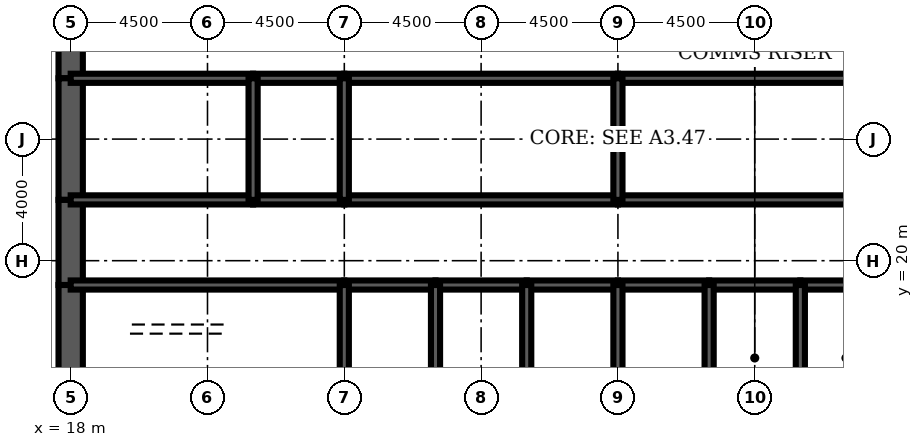
"""IFC4 building model, lengths in metres.
Left out: names, types, materials, properties, quantities, classifications, styles, units other than length and angle.
Written with IfcOpenShell. Run it as: python <this file> out.ifc"""

import sys

from ifc_helpers import new_model, si_unit, direction, frame, frame_2d, origin, place, context, subcontext, project, spatial, rectangle, extrude, element, fill, save


model = new_model("IFC4")
c1 = context("Model", 3, precision=1e-05, world=origin(), true_north=direction((0.0, 1.0)))
c2 = subcontext(c1, "Body", "Model", "MODEL_VIEW")
j1 = project(units=[si_unit("LENGTHUNIT", "METRE"), si_unit("PLANEANGLEUNIT", "RADIAN")], contexts=[c1])
p1 = place(None, origin())
s1 = spatial("IfcSite", under=j1, at=p1, CompositionType="ELEMENT")
p2 = place(p1, origin())
s2 = spatial("IfcBuilding", under=s1, at=p2, CompositionType="ELEMENT")
p3 = place(p2, frame((0.0, 0.0, 202.6)))
s3 = spatial("IfcBuildingStorey", under=s2, at=p3, CompositionType="ELEMENT", Elevation=202.6)
p4 = place(p3, frame((18.0, 28.8, 0.0), z_axis=(0.0, 0.0, 1.0), x_axis=(0.0, -1.0, 0.0)))
e1 = element("IfcWall", 1, at=p4, inside=s3, PredefinedType="SHEAR", context=c2, shape_type="SweptSolid", body=[
    extrude(rectangle(XDim=2.8, YDim=0.8, at=frame_2d((1.4, 0.0))), origin(), (0.0, 0.0, 1.0), 4.2),
])
p5 = place(p4, frame((0.4, 0.0, 0.0)))
e2 = element("IfcOpeningElement", 2, at=p5, cuts=e1, PredefinedType="OPENING", context=c2, shape_type="SweptSolid", body=[
    extrude(rectangle(XDim=1.8, YDim=2.1, at=frame_2d((0.9, 1.05))), frame((0.0, 0.41, 0.0), z_axis=(0.0, -1.0, 0.0), x_axis=(1.0, 0.0, 0.0)), (0.0, 0.0, 1.0), 0.82),
])
p6 = place(p3, frame((18.0, 26.0, 0.0), z_axis=(0.0, 0.0, 1.0), x_axis=(0.0, -1.0, 0.0)))
e3 = element("IfcWall", 3, at=p6, inside=s3, PredefinedType="SHEAR", context=c2, shape_type="SweptSolid", body=[
    extrude(rectangle(XDim=4.0, YDim=0.8, at=frame_2d((2.0, 0.0))), origin(), (0.0, 0.0, 1.0), 4.2),
])
p7 = place(p3, frame((18.0, 22.0, 0.0), z_axis=(0.0, 0.0, 1.0), x_axis=(0.0, -1.0, 0.0)))
e4 = element("IfcWall", 4, at=p7, inside=s3, PredefinedType="SHEAR", context=c2, shape_type="SweptSolid", body=[
    extrude(rectangle(XDim=2.8, YDim=0.8, at=frame_2d((1.4, 0.0))), origin(), (0.0, 0.0, 1.0), 4.2),
])
p8 = place(p7, frame((0.6, 0.0, 0.0)))
e5 = element("IfcOpeningElement", 5, at=p8, cuts=e4, PredefinedType="OPENING", context=c2, shape_type="SweptSolid", body=[
    extrude(rectangle(XDim=1.8, YDim=2.1, at=frame_2d((0.9, 1.05))), frame((0.0, 0.41, 0.0), z_axis=(0.0, -1.0, 0.0), x_axis=(1.0, 0.0, 0.0)), (0.0, 0.0, 1.0), 0.82),
])
p9 = place(p3, frame((18.0, 19.2, 0.0), z_axis=(0.0, 0.0, 1.0), x_axis=(0.0, -1.0, 0.0)))
e6 = element("IfcWall", 6, at=p9, inside=s3, PredefinedType="SHEAR", context=c2, shape_type="SweptSolid", body=[
    extrude(rectangle(XDim=3.2, YDim=0.8, at=frame_2d((1.6, 0.0))), origin(), (0.0, 0.0, 1.0), 4.2),
])
p10 = place(p3, frame((18.0, 19.2, 0.0), z_axis=(0.0, 0.0, 1.0), x_axis=(1.0, 0.0, 0.0)))
e7 = element("IfcWall", 7, at=p10, inside=s3, PredefinedType="SOLIDWALL", context=c2, shape_type="SweptSolid", body=[
    extrude(rectangle(XDim=9.0, YDim=0.3, at=frame_2d((4.5, 0.0))), origin(), (0.0, 0.0, 1.0), 4.2),
])
p11 = place(p10, frame((0.65, 0.0, 0.0)))
e8 = element("IfcOpeningElement", 8, at=p11, cuts=e7, PredefinedType="OPENING", context=c2, shape_type="SweptSolid", body=[
    extrude(rectangle(XDim=1.0, YDim=2.1, at=frame_2d((0.5, 1.05))), frame((0.0, 0.16, 0.0), z_axis=(0.0, -1.0, 0.0), x_axis=(1.0, 0.0, 0.0)), (0.0, 0.0, 1.0), 0.32),
])
p12 = place(p3, frame((27.0, 19.2, 0.0), z_axis=(0.0, 0.0, 1.0), x_axis=(1.0, 0.0, 0.0)))
e9 = element("IfcWall", 9, at=p12, inside=s3, PredefinedType="SOLIDWALL", context=c2, shape_type="SweptSolid", body=[
    extrude(rectangle(XDim=3.0, YDim=0.3, at=frame_2d((1.5, 0.0))), origin(), (0.0, 0.0, 1.0), 4.2),
])
p13 = place(p12, frame((0.95, 0.0, 0.0)))
e10 = element("IfcOpeningElement", 10, at=p13, cuts=e9, PredefinedType="OPENING", context=c2, shape_type="SweptSolid", body=[
    extrude(rectangle(XDim=1.1, YDim=2.2, at=frame_2d((0.55, 1.1))), frame((0.0, 0.16, 0.0), z_axis=(0.0, -1.0, 0.0), x_axis=(1.0, 0.0, 0.0)), (0.0, 0.0, 1.0), 0.32),
])
p14 = place(p3, frame((30.0, 19.2, 0.0), z_axis=(0.0, 0.0, 1.0), x_axis=(1.0, 0.0, 0.0)))
e11 = element("IfcWall", 11, at=p14, inside=s3, PredefinedType="SOLIDWALL", context=c2, shape_type="SweptSolid", body=[
    extrude(rectangle(XDim=3.0, YDim=0.3, at=frame_2d((1.5, 0.0))), origin(), (0.0, 0.0, 1.0), 4.2),
])
p15 = place(p14, frame((0.95, 0.0, 0.0)))
e12 = element("IfcOpeningElement", 12, at=p15, cuts=e11, PredefinedType="OPENING", context=c2, shape_type="SweptSolid", body=[
    extrude(rectangle(XDim=1.1, YDim=2.2, at=frame_2d((0.55, 1.1))), frame((0.0, 0.16, 0.0), z_axis=(0.0, -1.0, 0.0), x_axis=(1.0, 0.0, 0.0)), (0.0, 0.0, 1.0), 0.32),
])
p16 = place(p3, frame((33.0, 19.2, 0.0), z_axis=(0.0, 0.0, 1.0), x_axis=(1.0, 0.0, 0.0)))
e13 = element("IfcWall", 13, at=p16, inside=s3, PredefinedType="SOLIDWALL", context=c2, shape_type="SweptSolid", body=[
    extrude(rectangle(XDim=3.0, YDim=0.3, at=frame_2d((1.5, 0.0))), origin(), (0.0, 0.0, 1.0), 4.2),
])
p17 = place(p16, frame((0.95, 0.0, 0.0)))
e14 = element("IfcOpeningElement", 14, at=p17, cuts=e13, PredefinedType="OPENING", context=c2, shape_type="SweptSolid", body=[
    extrude(rectangle(XDim=1.1, YDim=2.2, at=frame_2d((0.55, 1.1))), frame((0.0, 0.16, 0.0), z_axis=(0.0, -1.0, 0.0), x_axis=(1.0, 0.0, 0.0)), (0.0, 0.0, 1.0), 0.32),
])
p18 = place(p3, frame((36.0, 19.2, 0.0), z_axis=(0.0, 0.0, 1.0), x_axis=(1.0, 0.0, 0.0)))
e15 = element("IfcWall", 15, at=p18, inside=s3, PredefinedType="SOLIDWALL", context=c2, shape_type="SweptSolid", body=[
    extrude(rectangle(XDim=3.0, YDim=0.3, at=frame_2d((1.5, 0.0))), origin(), (0.0, 0.0, 1.0), 4.2),
])
p19 = place(p18, frame((0.95, 0.0, 0.0)))
e16 = element("IfcOpeningElement", 16, at=p19, cuts=e15, PredefinedType="OPENING", context=c2, shape_type="SweptSolid", body=[
    extrude(rectangle(XDim=1.1, YDim=2.2, at=frame_2d((0.55, 1.1))), frame((0.0, 0.16, 0.0), z_axis=(0.0, -1.0, 0.0), x_axis=(1.0, 0.0, 0.0)), (0.0, 0.0, 1.0), 0.32),
])
p20 = place(p3, frame((39.0, 19.2, 0.0), z_axis=(0.0, 0.0, 1.0), x_axis=(1.0, 0.0, 0.0)))
e17 = element("IfcWall", 17, at=p20, inside=s3, PredefinedType="SOLIDWALL", context=c2, shape_type="SweptSolid", body=[
    extrude(rectangle(XDim=3.0, YDim=0.3, at=frame_2d((1.5, 0.0))), origin(), (0.0, 0.0, 1.0), 4.2),
])
p21 = place(p20, frame((1.0, 0.0, 0.0)))
e18 = element("IfcOpeningElement", 18, at=p21, cuts=e17, PredefinedType="OPENING", context=c2, shape_type="SweptSolid", body=[
    extrude(rectangle(XDim=1.0, YDim=2.1, at=frame_2d((0.5, 1.05))), frame((0.0, 0.16, 0.0), z_axis=(0.0, -1.0, 0.0), x_axis=(1.0, 0.0, 0.0)), (0.0, 0.0, 1.0), 0.32),
])
p22 = place(p3, frame((42.0, 19.2, 0.0), z_axis=(0.0, 0.0, 1.0), x_axis=(1.0, 0.0, 0.0)))
e19 = element("IfcWall", 19, at=p22, inside=s3, PredefinedType="SOLIDWALL", context=c2, shape_type="SweptSolid", body=[
    extrude(rectangle(XDim=3.0, YDim=0.3, at=frame_2d((1.5, 0.0))), origin(), (0.0, 0.0, 1.0), 4.2),
])
p23 = place(p22, frame((1.0, 0.0, 0.0)))
e20 = element("IfcOpeningElement", 20, at=p23, cuts=e19, PredefinedType="OPENING", context=c2, shape_type="SweptSolid", body=[
    extrude(rectangle(XDim=1.0, YDim=2.1, at=frame_2d((0.5, 1.05))), frame((0.0, 0.16, 0.0), z_axis=(0.0, -1.0, 0.0), x_axis=(1.0, 0.0, 0.0)), (0.0, 0.0, 1.0), 0.32),
])
p24 = place(p3, frame((18.0, 22.0, 0.0), z_axis=(0.0, 0.0, 1.0), x_axis=(1.0, 0.0, 0.0)))
e21 = element("IfcWall", 21, at=p24, inside=s3, PredefinedType="SOLIDWALL", context=c2, shape_type="SweptSolid", body=[
    extrude(rectangle(XDim=6.0, YDim=0.3, at=frame_2d((3.0, 0.0))), origin(), (0.0, 0.0, 1.0), 4.2),
])
p25 = place(p24, frame((4.4, 0.0, 0.0)))
e22 = element("IfcOpeningElement", 22, at=p25, cuts=e21, PredefinedType="OPENING", context=c2, shape_type="SweptSolid", body=[
    extrude(rectangle(XDim=1.0, YDim=2.1, at=frame_2d((0.5, 1.05))), frame((0.0, 0.16, 0.0), z_axis=(0.0, -1.0, 0.0), x_axis=(1.0, 0.0, 0.0)), (0.0, 0.0, 1.0), 0.32),
])
p26 = place(p24, frame((0.65, 0.0, 0.0)))
e23 = element("IfcOpeningElement", 23, at=p26, cuts=e21, PredefinedType="OPENING", context=c2, shape_type="SweptSolid", body=[
    extrude(rectangle(XDim=1.0, YDim=2.1, at=frame_2d((0.5, 1.05))), frame((0.0, 0.16, 0.0), z_axis=(0.0, -1.0, 0.0), x_axis=(1.0, 0.0, 0.0)), (0.0, 0.0, 1.0), 0.32),
])
p27 = place(p3, frame((24.0, 22.0, 0.0), z_axis=(0.0, 0.0, 1.0), x_axis=(1.0, 0.0, 0.0)))
e24 = element("IfcWall", 24, at=p27, inside=s3, PredefinedType="SOLIDWALL", context=c2, shape_type="SweptSolid", body=[
    extrude(rectangle(XDim=3.0, YDim=0.3, at=frame_2d((1.5, 0.0))), origin(), (0.0, 0.0, 1.0), 4.2),
])
p28 = place(p27, frame((1.0, 0.0, 0.0)))
e25 = element("IfcOpeningElement", 25, at=p28, cuts=e24, PredefinedType="OPENING", context=c2, shape_type="SweptSolid", body=[
    extrude(rectangle(XDim=1.0, YDim=2.1, at=frame_2d((0.5, 1.05))), frame((0.0, 0.16, 0.0), z_axis=(0.0, -1.0, 0.0), x_axis=(1.0, 0.0, 0.0)), (0.0, 0.0, 1.0), 0.32),
])
p29 = place(p3, frame((27.0, 22.0, 0.0), z_axis=(0.0, 0.0, 1.0), x_axis=(1.0, 0.0, 0.0)))
e26 = element("IfcWall", 26, at=p29, inside=s3, PredefinedType="SOLIDWALL", context=c2, shape_type="SweptSolid", body=[
    extrude(rectangle(XDim=9.0, YDim=0.3, at=frame_2d((4.5, 0.0))), origin(), (0.0, 0.0, 1.0), 4.2),
])
p30 = place(p29, frame((4.0, 0.0, 0.0)))
e27 = element("IfcOpeningElement", 27, at=p30, cuts=e26, PredefinedType="OPENING", context=c2, shape_type="SweptSolid", body=[
    extrude(rectangle(XDim=1.0, YDim=2.1, at=frame_2d((0.5, 1.05))), frame((0.0, 0.16, 0.0), z_axis=(0.0, -1.0, 0.0), x_axis=(1.0, 0.0, 0.0)), (0.0, 0.0, 1.0), 0.32),
])
p31 = place(p3, frame((36.0, 22.0, 0.0), z_axis=(0.0, 0.0, 1.0), x_axis=(1.0, 0.0, 0.0)))
e28 = element("IfcWall", 28, at=p31, inside=s3, PredefinedType="SOLIDWALL", context=c2, shape_type="SweptSolid", body=[
    extrude(rectangle(XDim=9.0, YDim=0.3, at=frame_2d((4.5, 0.0))), origin(), (0.0, 0.0, 1.0), 4.2),
])
p32 = place(p31, frame((4.0, 0.0, 0.0)))
e29 = element("IfcOpeningElement", 29, at=p32, cuts=e28, PredefinedType="OPENING", context=c2, shape_type="SweptSolid", body=[
    extrude(rectangle(XDim=1.0, YDim=2.1, at=frame_2d((0.5, 1.05))), frame((0.0, 0.16, 0.0), z_axis=(0.0, -1.0, 0.0), x_axis=(1.0, 0.0, 0.0)), (0.0, 0.0, 1.0), 0.32),
])
p33 = place(p3, frame((18.0, 26.0, 0.0), z_axis=(0.0, 0.0, 1.0), x_axis=(1.0, 0.0, 0.0)))
e30 = element("IfcWall", 30, at=p33, inside=s3, PredefinedType="SOLIDWALL", context=c2, shape_type="SweptSolid", body=[
    extrude(rectangle(XDim=6.0, YDim=0.3, at=frame_2d((3.0, 0.0))), origin(), (0.0, 0.0, 1.0), 4.2),
])
p34 = place(p3, frame((24.0, 26.0, 0.0), z_axis=(0.0, 0.0, 1.0), x_axis=(1.0, 0.0, 0.0)))
e31 = element("IfcWall", 31, at=p34, inside=s3, PredefinedType="SOLIDWALL", context=c2, shape_type="SweptSolid", body=[
    extrude(rectangle(XDim=3.0, YDim=0.3, at=frame_2d((1.5, 0.0))), origin(), (0.0, 0.0, 1.0), 4.2),
])
for number, where, z_axis, x_axis in (
    (32, (27.0, 26.0, 0.0), (0.0, 0.0, 1.0), (1.0, 0.0, 0.0)),
    (33, (36.0, 26.0, 0.0), (0.0, 0.0, 1.0), (1.0, 0.0, 0.0)),
):
    element("IfcWall", number, at=place(p3, frame(where, z_axis=z_axis, x_axis=x_axis)), inside=s3, PredefinedType="SOLIDWALL", context=c2, shape_type="SweptSolid", body=[
        extrude(rectangle(XDim=9.0, YDim=0.3, at=frame_2d((4.5, 0.0))), origin(), (0.0, 0.0, 1.0), 4.2),
    ])
for number, where, z_axis, x_axis in (
    (34, (27.0, 16.0, 0.0), (0.0, 0.0, 1.0), (0.0, 1.0, 0.0)),
    (35, (30.0, 16.0, 0.0), (0.0, 0.0, 1.0), (0.0, 1.0, 0.0)),
    (36, (33.0, 16.0, 0.0), (0.0, 0.0, 1.0), (0.0, 1.0, 0.0)),
    (37, (36.0, 16.0, 0.0), (0.0, 0.0, 1.0), (0.0, 1.0, 0.0)),
    (38, (39.0, 16.0, 0.0), (0.0, 0.0, 1.0), (0.0, 1.0, 0.0)),
    (39, (42.0, 16.0, 0.0), (0.0, 0.0, 1.0), (0.0, 1.0, 0.0)),
):
    element("IfcWall", number, at=place(p3, frame(where, z_axis=z_axis, x_axis=x_axis)), inside=s3, PredefinedType="SOLIDWALL", context=c2, shape_type="SweptSolid", body=[
        extrude(rectangle(XDim=3.2, YDim=0.3, at=frame_2d((1.6, 0.0))), origin(), (0.0, 0.0, 1.0), 4.2),
    ])
for number, where, z_axis, x_axis in (
    (40, (24.0, 22.0, 0.0), (0.0, 0.0, 1.0), (0.0, 1.0, 0.0)),
    (41, (27.0, 22.0, 0.0), (0.0, 0.0, 1.0), (0.0, 1.0, 0.0)),
    (42, (36.0, 22.0, 0.0), (0.0, 0.0, 1.0), (0.0, 1.0, 0.0)),
):
    element("IfcWall", number, at=place(p3, frame(where, z_axis=z_axis, x_axis=x_axis)), inside=s3, PredefinedType="SOLIDWALL", context=c2, shape_type="SweptSolid", body=[
        extrude(rectangle(XDim=4.0, YDim=0.3, at=frame_2d((2.0, 0.0))), origin(), (0.0, 0.0, 1.0), 4.2),
    ])
p35 = place(p3, frame((39.15, 17.35, 0.0), z_axis=(0.0, 0.0, 1.0), x_axis=(1.0, 0.0, 0.0)))
e43 = element("IfcWall", 43, at=p35, inside=s3, PredefinedType="SOLIDWALL", context=c2, shape_type="SweptSolid", body=[
    extrude(rectangle(XDim=2.7, YDim=0.3, at=frame_2d((1.35, 0.0))), origin(), (0.0, 0.0, 1.0), 4.04),
])
p36 = place(p35, frame((0.85, 0.0, 0.0)))
e44 = element("IfcOpeningElement", 44, at=p36, cuts=e43, PredefinedType="OPENING", context=c2, shape_type="SweptSolid", body=[
    extrude(rectangle(XDim=1.0, YDim=2.1, at=frame_2d((0.5, 1.05))), frame((0.0, 0.16, 0.0), z_axis=(0.0, -1.0, 0.0), x_axis=(1.0, 0.0, 0.0)), (0.0, 0.0, 1.0), 0.32),
])
p37 = place(p3, frame((42.15, 17.35, 0.0), z_axis=(0.0, 0.0, 1.0), x_axis=(1.0, 0.0, 0.0)))
e45 = element("IfcWall", 45, at=p37, inside=s3, PredefinedType="SOLIDWALL", context=c2, shape_type="SweptSolid", body=[
    extrude(rectangle(XDim=2.7, YDim=0.3, at=frame_2d((1.35, 0.0))), origin(), (0.0, 0.0, 1.0), 4.04),
])
p38 = place(p37, frame((0.85, 0.0, 0.0)))
e46 = element("IfcOpeningElement", 46, at=p38, cuts=e45, PredefinedType="OPENING", context=c2, shape_type="SweptSolid", body=[
    extrude(rectangle(XDim=1.0, YDim=2.1, at=frame_2d((0.5, 1.05))), frame((0.0, 0.16, 0.0), z_axis=(0.0, -1.0, 0.0), x_axis=(1.0, 0.0, 0.0)), (0.0, 0.0, 1.0), 0.32),
])
p39 = place(p3, frame((42.5, 22.15, 0.0), z_axis=(0.0, 0.0, 1.0), x_axis=(0.0, 1.0, 0.0)))
e47 = element("IfcWall", 47, at=p39, inside=s3, PredefinedType="PARTITIONING", context=c2, shape_type="SweptSolid", body=[
    extrude(rectangle(XDim=3.7, YDim=0.15, at=frame_2d((1.85, 0.0))), origin(), (0.0, 0.0, 1.0), 3.0),
])
p40 = place(p39, frame((2.2, 0.0, 0.0)))
e48 = element("IfcOpeningElement", 48, at=p40, cuts=e47, PredefinedType="OPENING", context=c2, shape_type="SweptSolid", body=[
    extrude(rectangle(XDim=1.0, YDim=2.1, at=frame_2d((0.5, 1.05))), frame((0.0, 0.085, 0.0), z_axis=(0.0, -1.0, 0.0), x_axis=(1.0, 0.0, 0.0)), (0.0, 0.0, 1.0), 0.17),
])
p41 = place(p3, frame((19.975, 22.15, 0.0), z_axis=(0.0, 0.0, 1.0), x_axis=(0.0, 1.0, 0.0)))
e49 = element("IfcWall", 49, at=p41, inside=s3, PredefinedType="PARTITIONING", context=c2, shape_type="SweptSolid", body=[
    extrude(rectangle(XDim=3.7, YDim=0.15, at=frame_2d((1.85, 0.0))), origin(), (0.0, 0.0, 1.0), 3.0),
])
p42 = place(p3, frame((24.5, 19.35, 0.0), z_axis=(0.0, 0.0, 1.0), x_axis=(0.0, 1.0, 0.0)))
e50 = element("IfcWall", 50, at=p42, inside=s3, PredefinedType="PARTITIONING", context=c2, shape_type="SweptSolid", body=[
    extrude(rectangle(XDim=2.5, YDim=0.15, at=frame_2d((1.25, 0.0))), origin(), (0.0, 0.0, 1.0), 3.0),
])
p43 = place(p42, frame((1.15, 0.0, 0.0)))
e51 = element("IfcOpeningElement", 51, at=p43, cuts=e50, PredefinedType="OPENING", context=c2, shape_type="SweptSolid", body=[
    extrude(rectangle(XDim=1.0, YDim=2.1, at=frame_2d((0.5, 1.05))), frame((0.0, 0.085, 0.0), z_axis=(0.0, -1.0, 0.0), x_axis=(1.0, 0.0, 0.0)), (0.0, 0.0, 1.0), 0.17),
])
p44 = place(p36, origin())
e52 = element("IfcDoor", 52, at=p44, inside=s3, OperationType="SINGLE_SWING_LEFT", PredefinedType="DOOR", context=c2, shape_type="SweptSolid", body=[
    extrude(rectangle(XDim=1.0, YDim=2.1, at=frame_2d((0.5, 1.05))), frame((0.0, 0.025, 0.0), z_axis=(0.0, -1.0, 0.0), x_axis=(1.0, 0.0, 0.0)), (0.0, 0.0, 1.0), 0.05),
])
fill(e44, e52)
p45 = place(p38, origin())
e53 = element("IfcDoor", 53, at=p45, inside=s3, OperationType="SINGLE_SWING_LEFT", PredefinedType="DOOR", context=c2, shape_type="SweptSolid", body=[
    extrude(rectangle(XDim=1.0, YDim=2.1, at=frame_2d((0.5, 1.05))), frame((0.0, 0.025, 0.0), z_axis=(0.0, -1.0, 0.0), x_axis=(1.0, 0.0, 0.0)), (0.0, 0.0, 1.0), 0.05),
])
fill(e46, e53)
p46 = place(p40, origin())
e54 = element("IfcDoor", 54, at=p46, inside=s3, OperationType="SINGLE_SWING_RIGHT", PredefinedType="DOOR", context=c2, shape_type="SweptSolid", body=[
    extrude(rectangle(XDim=1.0, YDim=2.1, at=frame_2d((0.5, 1.05))), frame((0.0, 0.025, 0.0), z_axis=(0.0, -1.0, 0.0), x_axis=(1.0, 0.0, 0.0)), (0.0, 0.0, 1.0), 0.05),
])
fill(e48, e54)
p47 = place(p43, origin())
e55 = element("IfcDoor", 55, at=p47, inside=s3, OperationType="SINGLE_SWING_RIGHT", PredefinedType="DOOR", context=c2, shape_type="SweptSolid", body=[
    extrude(rectangle(XDim=1.0, YDim=2.1, at=frame_2d((0.5, 1.05))), frame((0.0, 0.025, 0.0), z_axis=(0.0, -1.0, 0.0), x_axis=(1.0, 0.0, 0.0)), (0.0, 0.0, 1.0), 0.05),
])
fill(e51, e55)
p48 = place(p13, origin())
e56 = element("IfcDoor", 56, at=p48, inside=s3, OperationType="DOUBLE_DOOR_SLIDING", PredefinedType="USERDEFINED", context=c2, shape_type="SweptSolid", body=[
    extrude(rectangle(XDim=1.1, YDim=2.2, at=frame_2d((0.55, 1.1))), frame((0.0, 0.025, 0.0), z_axis=(0.0, -1.0, 0.0), x_axis=(1.0, 0.0, 0.0)), (0.0, 0.0, 1.0), 0.05),
])
fill(e10, e56)
p49 = place(p15, origin())
e57 = element("IfcDoor", 57, at=p49, inside=s3, OperationType="DOUBLE_DOOR_SLIDING", PredefinedType="USERDEFINED", context=c2, shape_type="SweptSolid", body=[
    extrude(rectangle(XDim=1.1, YDim=2.2, at=frame_2d((0.55, 1.1))), frame((0.0, 0.025, 0.0), z_axis=(0.0, -1.0, 0.0), x_axis=(1.0, 0.0, 0.0)), (0.0, 0.0, 1.0), 0.05),
])
fill(e12, e57)
p50 = place(p17, origin())
e58 = element("IfcDoor", 58, at=p50, inside=s3, OperationType="DOUBLE_DOOR_SLIDING", PredefinedType="USERDEFINED", context=c2, shape_type="SweptSolid", body=[
    extrude(rectangle(XDim=1.1, YDim=2.2, at=frame_2d((0.55, 1.1))), frame((0.0, 0.025, 0.0), z_axis=(0.0, -1.0, 0.0), x_axis=(1.0, 0.0, 0.0)), (0.0, 0.0, 1.0), 0.05),
])
fill(e14, e58)
p51 = place(p19, origin())
e59 = element("IfcDoor", 59, at=p51, inside=s3, OperationType="DOUBLE_DOOR_SLIDING", PredefinedType="USERDEFINED", context=c2, shape_type="SweptSolid", body=[
    extrude(rectangle(XDim=1.1, YDim=2.2, at=frame_2d((0.55, 1.1))), frame((0.0, 0.025, 0.0), z_axis=(0.0, -1.0, 0.0), x_axis=(1.0, 0.0, 0.0)), (0.0, 0.0, 1.0), 0.05),
])
fill(e16, e59)
p52 = place(p11, origin())
e60 = element("IfcDoor", 60, at=p52, inside=s3, OperationType="SINGLE_SWING_LEFT", PredefinedType="DOOR", context=c2, shape_type="SweptSolid", body=[
    extrude(rectangle(XDim=1.0, YDim=2.1, at=frame_2d((0.5, 1.05))), frame((0.0, 0.025, 0.0), z_axis=(0.0, -1.0, 0.0), x_axis=(1.0, 0.0, 0.0)), (0.0, 0.0, 1.0), 0.05),
])
fill(e8, e60)
p53 = place(p8, origin())
e61 = element("IfcDoor", 61, at=p53, inside=s3, OperationType="SINGLE_SWING_LEFT", PredefinedType="DOOR", context=c2, shape_type="SweptSolid", body=[
    extrude(rectangle(XDim=1.8, YDim=2.1, at=frame_2d((0.9, 1.05))), frame((0.0, 0.4, 0.0), z_axis=(0.0, -1.0, 0.0), x_axis=(1.0, 0.0, 0.0)), (0.0, 0.0, 1.0), 0.8),
])
fill(e5, e61)
p54 = place(p5, origin())
e62 = element("IfcDoor", 62, at=p54, inside=s3, OperationType="SINGLE_SWING_LEFT", PredefinedType="DOOR", context=c2, shape_type="SweptSolid", body=[
    extrude(rectangle(XDim=1.8, YDim=2.1, at=frame_2d((0.9, 1.05))), frame((0.0, 0.4, 0.0), z_axis=(0.0, -1.0, 0.0), x_axis=(1.0, 0.0, 0.0)), (0.0, 0.0, 1.0), 0.8),
])
fill(e2, e62)
p55 = place(p25, origin())
e63 = element("IfcDoor", 63, at=p55, inside=s3, OperationType="SINGLE_SWING_RIGHT", PredefinedType="DOOR", context=c2, shape_type="SweptSolid", body=[
    extrude(rectangle(XDim=1.0, YDim=2.1, at=frame_2d((0.5, 1.05))), frame((0.0, 0.025, 0.0), z_axis=(0.0, -1.0, 0.0), x_axis=(1.0, 0.0, 0.0)), (0.0, 0.0, 1.0), 0.05),
])
fill(e22, e63)
p56 = place(p28, origin())
e64 = element("IfcDoor", 64, at=p56, inside=s3, OperationType="SINGLE_SWING_LEFT", PredefinedType="DOOR", context=c2, shape_type="SweptSolid", body=[
    extrude(rectangle(XDim=1.0, YDim=2.1, at=frame_2d((0.5, 1.05))), frame((0.0, 0.025, 0.0), z_axis=(0.0, -1.0, 0.0), x_axis=(1.0, 0.0, 0.0)), (0.0, 0.0, 1.0), 0.05),
])
fill(e25, e64)
p57 = place(p30, origin())
e65 = element("IfcDoor", 65, at=p57, inside=s3, OperationType="SINGLE_SWING_LEFT", PredefinedType="DOOR", context=c2, shape_type="SweptSolid", body=[
    extrude(rectangle(XDim=1.0, YDim=2.1, at=frame_2d((0.5, 1.05))), frame((0.0, 0.025, 0.0), z_axis=(0.0, -1.0, 0.0), x_axis=(1.0, 0.0, 0.0)), (0.0, 0.0, 1.0), 0.05),
])
fill(e27, e65)
p58 = place(p32, origin())
e66 = element("IfcDoor", 66, at=p58, inside=s3, OperationType="SINGLE_SWING_LEFT", PredefinedType="DOOR", context=c2, shape_type="SweptSolid", body=[
    extrude(rectangle(XDim=1.0, YDim=2.1, at=frame_2d((0.5, 1.05))), frame((0.0, 0.025, 0.0), z_axis=(0.0, -1.0, 0.0), x_axis=(1.0, 0.0, 0.0)), (0.0, 0.0, 1.0), 0.05),
])
fill(e29, e66)
p59 = place(p26, origin())
e67 = element("IfcDoor", 67, at=p59, inside=s3, OperationType="SINGLE_SWING_LEFT", PredefinedType="DOOR", context=c2, shape_type="SweptSolid", body=[
    extrude(rectangle(XDim=1.0, YDim=2.1, at=frame_2d((0.5, 1.05))), frame((0.0, 0.025, 0.0), z_axis=(0.0, -1.0, 0.0), x_axis=(1.0, 0.0, 0.0)), (0.0, 0.0, 1.0), 0.05),
])
fill(e23, e67)
p60 = place(p21, origin())
e68 = element("IfcDoor", 68, at=p60, inside=s3, OperationType="SINGLE_SWING_LEFT", PredefinedType="DOOR", context=c2, shape_type="SweptSolid", body=[
    extrude(rectangle(XDim=1.0, YDim=2.1, at=frame_2d((0.5, 1.05))), frame((0.0, 0.025, 0.0), z_axis=(0.0, -1.0, 0.0), x_axis=(1.0, 0.0, 0.0)), (0.0, 0.0, 1.0), 0.05),
])
fill(e18, e68)
p61 = place(p23, origin())
e69 = element("IfcDoor", 69, at=p61, inside=s3, OperationType="SINGLE_SWING_LEFT", PredefinedType="DOOR", context=c2, shape_type="SweptSolid", body=[
    extrude(rectangle(XDim=1.0, YDim=2.1, at=frame_2d((0.5, 1.05))), frame((0.0, 0.025, 0.0), z_axis=(0.0, -1.0, 0.0), x_axis=(1.0, 0.0, 0.0)), (0.0, 0.0, 1.0), 0.05),
])
fill(e20, e69)
save(model, sys.argv[1])
